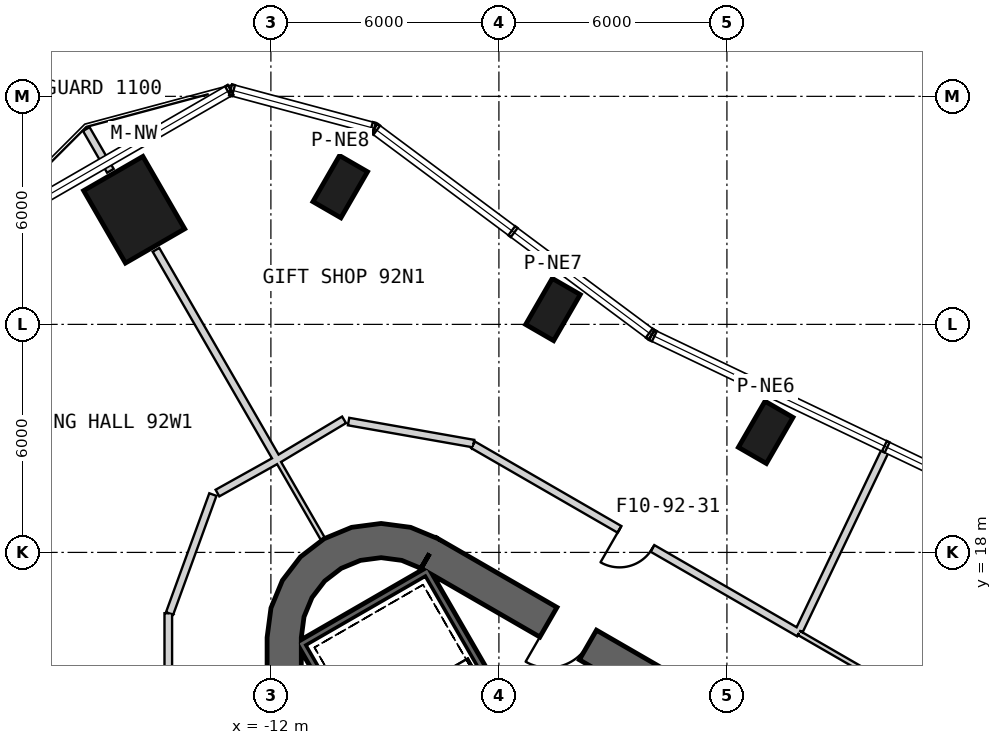
"""IFC4 building model, lengths in metres.
Left out: names, types, materials, properties, quantities, classifications, styles, units other than length and angle.
Written with IfcOpenShell. Run it as: python <this file> out.ifc"""

import sys

from ifc_helpers import new_model, si_unit, direction, frame, frame_2d, origin, origin_2d, place, context, subcontext, project, spatial, polyline, rectangle, outline, extrude, element, fill, save


model = new_model("IFC4")
c1 = context("Model", 3, precision=1e-05, world=origin(), true_north=direction((0.0, 1.0)))
c2 = subcontext(c1, "Body", "Model", "MODEL_VIEW")
j1 = project(units=[si_unit("LENGTHUNIT", "METRE"), si_unit("PLANEANGLEUNIT", "RADIAN")], contexts=[c1])
p1 = place(None, origin())
s1 = spatial("IfcSite", under=j1, at=p1, CompositionType="ELEMENT")
p2 = place(p1, origin())
s2 = spatial("IfcBuilding", under=s1, at=p2, CompositionType="ELEMENT")
p3 = place(p2, frame((0.0, 0.0, 404.8)))
s3 = spatial("IfcBuildingStorey", under=s2, at=p3, CompositionType="ELEMENT", Elevation=404.8)
p4 = place(p3, frame((-15.598, 27.016, 0.0), z_axis=(0.0, 0.0, 1.0), x_axis=(-0.5, 0.866025403784, 0.0)))
e1 = element("IfcColumn", 1, at=p4, inside=s3, PredefinedType="COLUMN", context=c2, shape_type="SweptSolid", body=[
    extrude(rectangle(XDim=2.2, YDim=1.8, at=origin_2d()), origin(), (0.0, 0.0, 1.0), 5.25),
])
for number, where, z_axis, x_axis in (
    (2, (1.02, 21.159, 0.0), (0.0, 0.0, 1.0), (0.5, 0.866, 0.0)),
    (3, (-4.578, 24.391, 0.0), (0.0, 0.0, 1.0), (0.5, 0.866, 0.0)),
    (4, (-10.176, 27.623, 0.0), (0.0, 0.0, 1.0), (0.5, 0.866, 0.0)),
):
    element("IfcColumn", number, at=place(p3, frame(where, z_axis=z_axis, x_axis=x_axis)), inside=s3, PredefinedType="COLUMN", context=c2, shape_type="SweptSolid", body=[
        extrude(rectangle(XDim=1.4, YDim=0.85, at=origin_2d()), origin(), (0.0, 0.0, 1.0), 5.25),
    ])
p5 = place(p3, frame((19.475, 2.208, 0.0), z_axis=(0.0, 0.0, 1.0), x_axis=(-0.866028369851, 0.499994862586, 0.0)))
e5 = element("IfcWall", 5, at=p5, inside=s3, PredefinedType="SHEAR", context=c2, shape_type="SweptSolid", body=[
    extrude(rectangle(XDim=31.523, YDim=0.9, at=frame_2d((15.762, 0.0))), origin(), (0.0, 0.0, 1.0), 5.5),
])
p6 = place(p5, frame((3.612, 0.0, 0.0)))
e6 = element("IfcOpeningElement", 6, at=p6, cuts=e5, PredefinedType="OPENING", context=c2, shape_type="SweptSolid", body=[
    extrude(rectangle(XDim=1.2, YDim=2.4, at=frame_2d((0.6, 1.2))), frame((0.0, 0.46, 0.0), z_axis=(0.0, -1.0, 0.0), x_axis=(1.0, 0.0, 0.0)), (0.0, 0.0, 1.0), 0.92),
])
p7 = place(p5, frame((26.712, 0.0, 0.0)))
e7 = element("IfcOpeningElement", 7, at=p7, cuts=e5, PredefinedType="OPENING", context=c2, shape_type="SweptSolid", body=[
    extrude(rectangle(XDim=1.2, YDim=2.4, at=frame_2d((0.6, 1.2))), frame((0.0, 0.46, 0.0), z_axis=(0.0, -1.0, 0.0), x_axis=(1.0, 0.0, 0.0)), (0.0, 0.0, 1.0), 0.92),
])
p8 = place(p3, frame((-11.65, 15.762, 0.0), z_axis=(0.0, 0.0, 1.0), x_axis=(0.0, -1.0, 0.0)))
e8 = element("IfcWall", 8, at=p8, inside=s3, PredefinedType="SHEAR", context=c2, shape_type="SweptSolid", body=[
    extrude(rectangle(XDim=31.523, YDim=0.9, at=frame_2d((15.762, 0.0))), origin(), (0.0, 0.0, 1.0), 5.5),
])
p9 = place(p8, frame((3.612, 0.0, 0.0)))
e9 = element("IfcOpeningElement", 9, at=p9, cuts=e8, PredefinedType="OPENING", context=c2, shape_type="SweptSolid", body=[
    extrude(rectangle(XDim=1.2, YDim=2.4, at=frame_2d((0.6, 1.2))), frame((0.0, 0.46, 0.0), z_axis=(0.0, -1.0, 0.0), x_axis=(1.0, 0.0, 0.0)), (0.0, 0.0, 1.0), 0.92),
])
p10 = place(p8, frame((26.712, 0.0, 0.0)))
e10 = element("IfcOpeningElement", 10, at=p10, cuts=e8, PredefinedType="OPENING", context=c2, shape_type="SweptSolid", body=[
    extrude(rectangle(XDim=1.2, YDim=2.4, at=frame_2d((0.6, 1.2))), frame((0.0, 0.46, 0.0), z_axis=(0.0, -1.0, 0.0), x_axis=(1.0, 0.0, 0.0)), (0.0, 0.0, 1.0), 0.92),
])
p11 = place(p3, origin())
e11 = element("IfcWall", 11, at=p11, inside=s3, PredefinedType="SHEAR", context=c2, shape_type="SweptSolid", body=[
    extrude(outline(polyline([(-7.6, 18.36), (-8.323, 18.659), (-9.1, 18.762), (-9.876, 18.659), (-10.6, 18.36), (-11.221, 17.883), (-11.698, 17.262), (-11.998, 16.538), (-12.1, 15.762), (-11.2, 15.762), (-11.128, 16.305), (-10.919, 16.812), (-10.585, 17.247), (-10.15, 17.58), (-9.644, 17.79), (-9.1, 17.862), (-8.556, 17.79), (-8.05, 17.58), (-7.6, 18.36)])), origin(), (0.0, 0.0, 1.0), 5.5),
])
p12 = place(p3, frame((-11.245, 15.678, -0.3), z_axis=(0.0, 0.0, 1.0), x_axis=(0.499977274689, -0.866038523851, 0.0)))
e12 = element("IfcWall", 12, at=p12, inside=s3, PredefinedType="SHEAR", context=c2, shape_type="SweptSolid", body=[
    extrude(rectangle(XDim=8.1, YDim=0.2, at=frame_2d((4.05, 0.0))), origin(), (0.0, 0.0, 1.0), 5.55),
])
p13 = place(p3, frame((-7.818, 17.541, -0.3), z_axis=(0.0, 0.0, 1.0), x_axis=(-0.866044365799, -0.499967155389, 0.0)))
e13 = element("IfcWall", 13, at=p13, inside=s3, PredefinedType="SHEAR", context=c2, shape_type="SweptSolid", body=[
    extrude(rectangle(XDim=3.8, YDim=0.2, at=frame_2d((1.9, 0.0))), origin(), (0.0, 0.0, 1.0), 5.55),
])
p14 = place(p3, frame((-7.854, 17.405, -0.3), z_axis=(0.0, 0.0, 1.0), x_axis=(0.499997992926, -0.866026562566, 0.0)))
e14 = element("IfcWall", 14, at=p14, inside=s3, PredefinedType="SHEAR", context=c2, shape_type="SweptSolid", body=[
    extrude(rectangle(XDim=7.9, YDim=0.2, at=frame_2d((3.95, 0.0))), origin(), (0.0, 0.0, 1.0), 5.55),
])
p15 = place(p3, frame((-14.7, 16.399, 0.0), z_axis=(0.0, 0.0, 1.0), x_axis=(0.0, -1.0, 0.0)))
e15 = element("IfcWall", 15, at=p15, inside=s3, PredefinedType="PARTITIONING", context=c2, shape_type="SweptSolid", body=[
    extrude(rectangle(XDim=10.018, YDim=0.2, at=frame_2d((5.009, 0.0))), origin(), (0.0, 0.0, 1.0), 5.25),
])
p16 = place(p15, frame((4.5, 0.0, 0.0)))
e16 = element("IfcOpeningElement", 16, at=p16, cuts=e15, PredefinedType="OPENING", context=c2, shape_type="SweptSolid", body=[
    extrude(rectangle(XDim=1.0, YDim=2.1, at=frame_2d((0.5, 1.05))), frame((0.0, 0.11, 0.0), z_axis=(0.0, -1.0, 0.0), x_axis=(1.0, 0.0, 0.0)), (0.0, 0.0, 1.0), 0.22),
])
p17 = place(p3, frame((-13.527, 19.522, 0.0), z_axis=(0.0, 0.0, 1.0), x_axis=(-0.341978542333, -0.939707761266, 0.0)))
e17 = element("IfcWall", 17, at=p17, inside=s3, PredefinedType="PARTITIONING", context=c2, shape_type="SweptSolid", body=[
    extrude(rectangle(XDim=3.33, YDim=0.2, at=frame_2d((1.665, 0.0))), origin(), (0.0, 0.0, 1.0), 5.25),
])
p18 = place(p3, frame((-11.808, 20.452, 0.0), z_axis=(0.0, 0.0, 1.0), x_axis=(-0.873514477635, -0.486798169021, 0.0)))
e18 = element("IfcWall", 18, at=p18, inside=s3, PredefinedType="PARTITIONING", context=c2, shape_type="SweptSolid", body=[
    extrude(rectangle(XDim=1.83, YDim=0.2, at=frame_2d((0.915, 0.0))), origin(), (0.0, 0.0, 1.0), 3.02),
])
p19 = place(p3, frame((-11.849, 20.463, 0.0), z_axis=(0.0, 0.0, 1.0), x_axis=(0.500047596559, -0.865997922154, 0.0)))
e19 = element("IfcWall", 19, at=p19, inside=s3, PredefinedType="PARTITIONING", context=c2, shape_type="SweptSolid", body=[
    extrude(rectangle(XDim=2.6, YDim=0.12, at=frame_2d((1.3, 0.0))), origin(), (0.0, 0.0, 1.0), 3.02),
])
p20 = place(p3, frame((-11.849, 20.463, 0.0), z_axis=(0.0, 0.0, 1.0), x_axis=(-0.499993152284, 0.866029357279, 0.0)))
e20 = element("IfcWall", 20, at=p20, inside=s3, PredefinedType="PARTITIONING", context=c2, shape_type="SweptSolid", body=[
    extrude(rectangle(XDim=6.35, YDim=0.2, at=frame_2d((3.175, 0.0))), origin(), (0.0, 0.0, 1.0), 3.02),
])
p21 = place(p3, frame((-16.224, 28.041, 0.0), z_axis=(0.0, 0.0, 1.0), x_axis=(-0.499950289094, 0.866054102487, 0.0)))
e21 = element("IfcWall", 21, at=p21, inside=s3, PredefinedType="PARTITIONING", context=c2, shape_type="SweptSolid", body=[
    extrude(rectangle(XDim=1.268, YDim=0.2, at=frame_2d((0.634, 0.0))), origin(), (0.0, 0.0, 1.0), 5.25),
])
p22 = place(p3, frame((21.518, 4.551, 0.0), z_axis=(0.0, 0.0, 1.0), x_axis=(-0.866022813823, 0.500004485919, 0.0)))
e22 = element("IfcWall", 22, at=p22, inside=s3, PredefinedType="PARTITIONING", context=c2, shape_type="SweptSolid", body=[
    extrude(rectangle(XDim=22.655, YDim=0.12, at=frame_2d((11.327, 0.0))), origin(), (0.0, 0.0, 1.0), 5.25),
])
p23 = place(p22, frame((10.86, 0.0, 0.0)))
e23 = element("IfcOpeningElement", 23, at=p23, cuts=e22, PredefinedType="OPENING", context=c2, shape_type="SweptSolid", body=[
    extrude(rectangle(XDim=1.0, YDim=2.1, at=frame_2d((0.5, 1.05))), frame((0.0, 0.07, 0.0), z_axis=(0.0, -1.0, 0.0), x_axis=(1.0, 0.0, 0.0)), (0.0, 0.0, 1.0), 0.14),
])
p24 = place(p3, frame((-10.074, 21.489, 0.0), z_axis=(0.0, 0.0, 1.0), x_axis=(-0.858323699828, -0.513108591152, 0.0)))
e24 = element("IfcWall", 24, at=p24, inside=s3, PredefinedType="PARTITIONING", context=c2, shape_type="SweptSolid", body=[
    extrude(rectangle(XDim=2.02, YDim=0.2, at=frame_2d((1.01, 0.0))), origin(), (0.0, 0.0, 1.0), 3.02),
])
p25 = place(p3, frame((-6.667, 20.863, 0.0), z_axis=(0.0, 0.0, 1.0), x_axis=(-0.984809308694, 0.173639354725, 0.0)))
e25 = element("IfcWall", 25, at=p25, inside=s3, PredefinedType="PARTITIONING", context=c2, shape_type="SweptSolid", body=[
    extrude(rectangle(XDim=3.339, YDim=0.2, at=frame_2d((1.67, 0.0))), origin(), (0.0, 0.0, 1.0), 5.25),
])
p26 = place(p3, frame((1.898, 15.878, 0.0), z_axis=(0.0, 0.0, 1.0), x_axis=(-0.866032067792, 0.499988457423, 0.0)))
e26 = element("IfcWall", 26, at=p26, inside=s3, PredefinedType="PARTITIONING", context=c2, shape_type="SweptSolid", body=[
    extrude(rectangle(XDim=9.905, YDim=0.2, at=frame_2d((4.952, 0.0))), origin(), (0.0, 0.0, 1.0), 5.25),
])
p27 = place(p26, frame((4.456, 0.0, 0.0)))
e27 = element("IfcOpeningElement", 27, at=p27, cuts=e26, PredefinedType="OPENING", context=c2, shape_type="SweptSolid", body=[
    extrude(rectangle(XDim=1.0, YDim=2.1, at=frame_2d((0.5, 1.05))), frame((0.0, 0.11, 0.0), z_axis=(0.0, -1.0, 0.0), x_axis=(1.0, 0.0, 0.0)), (0.0, 0.0, 1.0), 0.22),
])
p28 = place(p3, frame((4.207, 20.766, 0.0), z_axis=(0.0, 0.0, 1.0), x_axis=(-0.431059382244, -0.902323561135, 0.0)))
e28 = element("IfcWall", 28, at=p28, inside=s3, PredefinedType="PARTITIONING", context=c2, shape_type="SweptSolid", body=[
    extrude(rectangle(XDim=5.344, YDim=0.2, at=frame_2d((2.672, 0.0))), origin(), (0.0, 0.0, 1.0), 5.25),
])
p29 = place(p27, origin())
e29 = element("IfcDoor", 29, at=p29, inside=s3, OperationType="SINGLE_SWING_RIGHT", PredefinedType="USERDEFINED", context=c2, shape_type="SweptSolid", body=[
    extrude(rectangle(XDim=1.0, YDim=2.1, at=frame_2d((0.5, 1.05))), frame((0.0, 0.025, 0.0), z_axis=(0.0, -1.0, 0.0), x_axis=(1.0, 0.0, 0.0)), (0.0, 0.0, 1.0), 0.05),
])
fill(e27, e29)
p30 = place(p7, origin())
e30 = element("IfcDoor", 30, at=p30, inside=s3, OperationType="SINGLE_SWING_RIGHT", PredefinedType="USERDEFINED", context=c2, shape_type="SweptSolid", body=[
    extrude(rectangle(XDim=1.2, YDim=2.4, at=frame_2d((0.6, 1.2))), frame((0.0, 0.025, 0.0), z_axis=(0.0, -1.0, 0.0), x_axis=(1.0, 0.0, 0.0)), (0.0, 0.0, 1.0), 0.05),
])
fill(e7, e30)
save(model, sys.argv[1])
